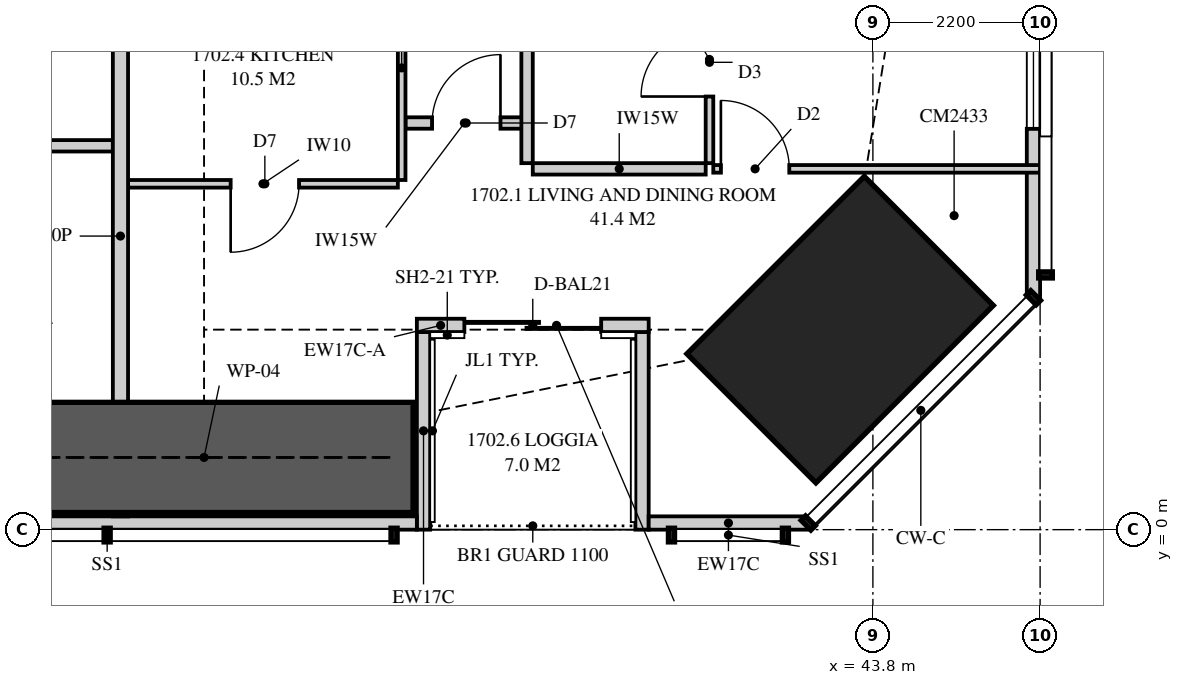
"""IFC4 building model, lengths in metres.
Left out: names, types, materials, properties, quantities, classifications, styles, units other than length and angle.
Written with IfcOpenShell. Run it as: python <this file> out.ifc"""

import sys

from ifc_helpers import new_model, si_unit, direction, frame, frame_2d, origin, origin_2d, place, context, subcontext, project, spatial, polyline, rectangle, outline, extrude, element, fill, save


model = new_model("IFC4")
c1 = context("Model", 3, precision=1e-05, world=origin(), true_north=direction((0.0, 1.0)))
c2 = subcontext(c1, "Body", "Model", "MODEL_VIEW")
j1 = project(units=[si_unit("LENGTHUNIT", "METRE"), si_unit("PLANEANGLEUNIT", "RADIAN")], contexts=[c1])
p1 = place(None, origin())
s1 = spatial("IfcSite", under=j1, at=p1, CompositionType="ELEMENT")
p2 = place(p1, origin())
s2 = spatial("IfcBuilding", under=s1, at=p2, CompositionType="ELEMENT")
p3 = place(p2, frame((0.0, 0.0, 64.55)))
s3 = spatial("IfcBuildingStorey", under=s2, at=p3, CompositionType="ELEMENT", Elevation=64.55)
p4 = place(p3, frame((43.369, 2.631, 0.0), z_axis=(0.0, 0.0, 1.0), x_axis=(-0.707106781187, 0.707106781187, 0.0)))
e1 = element("IfcColumn", 1, at=p4, inside=s3, PredefinedType="COLUMN", context=c2, shape_type="SweptSolid", body=[
    extrude(rectangle(XDim=2.4, YDim=3.3, at=origin_2d()), origin(), (0.0, 0.0, 1.0), 3.35),
])
p5 = place(p3, frame((20.525, 0.087, 0.0), z_axis=(0.0, 0.0, 1.0), x_axis=(1.0, 0.0, 0.0)))
e2 = element("IfcWall", 2, at=p5, inside=s3, PredefinedType="SOLIDWALL", context=c2, shape_type="SweptSolid", body=[
    extrude(outline(polyline([(0.0, 0.0), (17.275, 0.0), (17.275, 3.11), (14.679, 3.11), (14.679, 2.15), (14.631, 2.15), (14.631, 3.11), (14.475, 3.11), (14.475, 2.15), (0.0, 2.15), (0.0, 0.0)])), frame((0.0, 0.087, 0.0), z_axis=(0.0, -1.0, 0.0), x_axis=(1.0, 0.0, 0.0)), (0.0, 0.0, 1.0), 0.175),
])
p6 = place(p5, frame((6.775, 0.0, 0.4)))
e3 = element("IfcOpeningElement", 3, at=p6, cuts=e2, PredefinedType="OPENING", context=c2, shape_type="SweptSolid", body=[
    extrude(rectangle(XDim=1.8, YDim=1.7, at=frame_2d((0.9, 0.85))), frame((0.0, 0.097, 0.0), z_axis=(0.0, -1.0, 0.0), x_axis=(1.0, 0.0, 0.0)), (0.0, 0.0, 1.0), 0.195),
])
p7 = place(p5, frame((9.81, 0.0, 0.4)))
e4 = element("IfcOpeningElement", 4, at=p7, cuts=e2, PredefinedType="OPENING", context=c2, shape_type="SweptSolid", body=[
    extrude(rectangle(XDim=1.8, YDim=1.7, at=frame_2d((0.9, 0.85))), frame((0.0, 0.097, 0.0), z_axis=(0.0, -1.0, 0.0), x_axis=(1.0, 0.0, 0.0)), (0.0, 0.0, 1.0), 0.195),
])
p8 = place(p3, frame((40.85, 0.087, 0.0), z_axis=(0.0, 0.0, 1.0), x_axis=(1.0, 0.0, 0.0)))
e5 = element("IfcWall", 5, at=p8, inside=s3, PredefinedType="SOLIDWALL", context=c2, shape_type="SweptSolid", body=[
    extrude(rectangle(XDim=2.099, YDim=0.175, at=frame_2d((1.049, 0.0))), origin(), (0.0, 0.0, 1.0), 3.11),
])
p9 = place(p3, frame((37.8, 2.688, 0.0), z_axis=(0.0, 0.0, 1.0), x_axis=(1.0, 0.0, 0.0)))
e6 = element("IfcWall", 6, at=p9, inside=s3, PredefinedType="SOLIDWALL", context=c2, shape_type="SweptSolid", body=[
    extrude(rectangle(XDim=0.625, YDim=0.175, at=frame_2d((0.312, 0.0))), origin(), (0.0, 0.0, 1.0), 2.51),
])
p10 = place(p3, frame((38.425, 2.688, 0.0), z_axis=(0.0, 0.0, 1.0), x_axis=(1.0, 0.0, 0.0)))
e7 = element("IfcWall", 7, at=p10, inside=s3, PredefinedType="SOLIDWALL", context=c2, shape_type="SweptSolid", body=[
    extrude(rectangle(XDim=2.425, YDim=0.175, at=frame_2d((1.212, 0.0))), origin(), (0.0, 0.0, 1.0), 2.15),
])
p11 = place(p10, origin())
e8 = element("IfcOpeningElement", 8, at=p11, cuts=e7, PredefinedType="OPENING", context=c2, shape_type="SweptSolid", body=[
    extrude(rectangle(XDim=1.8, YDim=2.1, at=frame_2d((0.9, 1.05))), frame((0.0, 0.097, 0.0), z_axis=(0.0, -1.0, 0.0), x_axis=(1.0, 0.0, 0.0)), (0.0, 0.0, 1.0), 0.195),
])
p12 = place(p3, frame((37.887, 0.0, 0.0), z_axis=(0.0, 0.0, 1.0), x_axis=(0.0, 1.0, 0.0)))
e9 = element("IfcWall", 9, at=p12, inside=s3, PredefinedType="SOLIDWALL", context=c2, shape_type="SweptSolid", body=[
    extrude(outline(polyline([(0.0, 0.0), (2.6, 0.0), (2.6, 2.51), (2.364, 2.51), (2.364, 2.15), (0.697, 2.15), (0.697, 3.11), (0.0, 3.11), (0.0, 0.0)])), frame((0.0, 0.087, 0.0), z_axis=(0.0, -1.0, 0.0), x_axis=(1.0, 0.0, 0.0)), (0.0, 0.0, 1.0), 0.175),
])
p13 = place(p3, frame((40.762, 0.0, 0.0), z_axis=(0.0, 0.0, 1.0), x_axis=(0.0, 1.0, 0.0)))
e10 = element("IfcWall", 10, at=p13, inside=s3, PredefinedType="SOLIDWALL", context=c2, shape_type="SweptSolid", body=[
    extrude(outline(polyline([(0.0, 0.0), (2.6, 0.0), (2.6, 2.15), (1.274, 2.15), (1.274, 3.11), (0.0, 3.11), (0.0, 0.0)])), frame((0.0, 0.087, 0.0), z_axis=(0.0, -1.0, 0.0), x_axis=(1.0, 0.0, 0.0)), (0.0, 0.0, 1.0), 0.175),
])
p14 = place(p3, frame((45.913, 3.051, 0.0), z_axis=(0.0, 0.0, 1.0), x_axis=(0.0, 1.0, 0.0)))
e11 = element("IfcWall", 11, at=p14, inside=s3, PredefinedType="SOLIDWALL", context=c2, shape_type="SweptSolid", body=[
    extrude(outline(polyline([(0.0, 0.0), (31.897, 0.0), (31.897, 3.11), (22.167, 3.11), (22.167, 2.15), (22.074, 2.15), (22.074, 3.11), (21.949, 3.11), (21.949, 2.15), (9.949, 2.15), (9.949, 3.11), (9.823, 3.11), (9.823, 2.15), (9.73, 2.15), (9.73, 3.11), (0.0, 3.11), (0.0, 0.0)])), frame((0.0, 0.087, 0.0), z_axis=(0.0, -1.0, 0.0), x_axis=(1.0, 0.0, 0.0)), (0.0, 0.0, 1.0), 0.175),
])
p15 = place(p14, frame((2.222, 0.0, 0.4)))
e12 = element("IfcOpeningElement", 12, at=p15, cuts=e11, PredefinedType="OPENING", context=c2, shape_type="SweptSolid", body=[
    extrude(rectangle(XDim=1.8, YDim=1.7, at=frame_2d((0.9, 0.85))), frame((0.0, 0.097, 0.0), z_axis=(0.0, -1.0, 0.0), x_axis=(1.0, 0.0, 0.0)), (0.0, 0.0, 1.0), 0.195),
])
p16 = place(p14, frame((14.849, 0.0, 0.4)))
e13 = element("IfcOpeningElement", 13, at=p16, cuts=e11, PredefinedType="OPENING", context=c2, shape_type="SweptSolid", body=[
    extrude(rectangle(XDim=1.2, YDim=1.7, at=frame_2d((0.6, 0.85))), frame((0.0, 0.097, 0.0), z_axis=(0.0, -1.0, 0.0), x_axis=(1.0, 0.0, 0.0)), (0.0, 0.0, 1.0), 0.195),
])
p17 = place(p14, frame((27.375, 0.0, 0.4)))
e14 = element("IfcOpeningElement", 14, at=p17, cuts=e11, PredefinedType="OPENING", context=c2, shape_type="SweptSolid", body=[
    extrude(rectangle(XDim=1.8, YDim=1.7, at=frame_2d((0.9, 0.85))), frame((0.0, 0.097, 0.0), z_axis=(0.0, -1.0, 0.0), x_axis=(1.0, 0.0, 0.0)), (0.0, 0.0, 1.0), 0.195),
])
p18 = place(p3, frame((33.9, 0.175, 0.0), z_axis=(0.0, 0.0, 1.0), x_axis=(0.0, 1.0, 0.0)))
e15 = element("IfcWall", 15, at=p18, inside=s3, PredefinedType="PARTITIONING", context=c2, shape_type="SweptSolid", body=[
    extrude(outline(polyline([(0.529, 2.15), (0.0, 2.15), (0.0, 0.0), (0.529, 0.0), (0.529, 0.752), (1.021, 0.752), (1.021, 0.0), (7.375, 0.0), (7.375, 3.11), (1.685, 3.11), (1.685, 2.15), (1.021, 2.15), (1.021, 1.398), (0.529, 1.398), (0.529, 2.15)])), frame((0.0, 0.1, 0.0), z_axis=(0.0, -1.0, 0.0), x_axis=(1.0, 0.0, 0.0)), (0.0, 0.0, 1.0), 0.2),
])
p19 = place(p3, frame((29.95, 5.05, 0.0), z_axis=(0.0, 0.0, 1.0), x_axis=(1.0, 0.0, 0.0)))
e16 = element("IfcWall", 16, at=p19, inside=s3, PredefinedType="PLUMBINGWALL", context=c2, shape_type="SweptSolid", body=[
    extrude(rectangle(XDim=3.85, YDim=0.15, at=frame_2d((1.925, 0.0))), origin(), (0.0, 0.0, 1.0), 3.11),
])
p20 = place(p19, frame((0.4, 0.0, 0.0)))
e17 = element("IfcOpeningElement", 17, at=p20, cuts=e16, PredefinedType="OPENING", context=c2, shape_type="SweptSolid", body=[
    extrude(rectangle(XDim=0.9, YDim=2.1, at=frame_2d((0.45, 1.05))), frame((0.0, 0.085, 0.0), z_axis=(0.0, -1.0, 0.0), x_axis=(1.0, 0.0, 0.0)), (0.0, 0.0, 1.0), 0.17),
])
p21 = place(p3, frame((41.65, 4.822, 0.0), z_axis=(0.0, 0.0, 1.0), x_axis=(0.0, 1.0, 0.0)))
e18 = element("IfcWall", 18, at=p21, inside=s3, PredefinedType="PARTITIONING", context=c2, shape_type="SweptSolid", body=[
    extrude(rectangle(XDim=2.728, YDim=0.1, at=frame_2d((1.364, 0.0))), origin(), (0.0, 0.0, 1.0), 3.11),
])
p22 = place(p21, frame((0.877, 0.0, 0.0)))
e19 = element("IfcOpeningElement", 19, at=p22, cuts=e18, PredefinedType="OPENING", context=c2, shape_type="SweptSolid", body=[
    extrude(rectangle(XDim=0.9, YDim=2.1, at=frame_2d((0.45, 1.05))), frame((0.0, 0.06, 0.0), z_axis=(0.0, -1.0, 0.0), x_axis=(1.0, 0.0, 0.0)), (0.0, 0.0, 1.0), 0.12),
])
p23 = place(p3, frame((41.7, 4.747, 0.0), z_axis=(0.0, 0.0, 1.0), x_axis=(1.0, 0.0, 0.0)))
e20 = element("IfcWall", 20, at=p23, inside=s3, PredefinedType="PARTITIONING", context=c2, shape_type="SweptSolid", body=[
    extrude(outline(polyline([(0.0, 0.0), (4.3, 0.0), (4.3, 3.11), (2.883, 3.11), (2.883, 2.15), (1.14, 2.15), (1.14, 3.11), (0.0, 3.11), (0.0, 0.0)])), frame((0.0, 0.05, 0.0), z_axis=(0.0, -1.0, 0.0), x_axis=(1.0, 0.0, 0.0)), (0.0, 0.0, 1.0), 0.1),
])
p24 = place(p23, frame((0.1, 0.0, 0.0)))
e21 = element("IfcOpeningElement", 21, at=p24, cuts=e20, PredefinedType="OPENING", context=c2, shape_type="SweptSolid", body=[
    extrude(rectangle(XDim=0.9, YDim=2.1, at=frame_2d((0.45, 1.05))), frame((0.0, 0.06, 0.0), z_axis=(0.0, -1.0, 0.0), x_axis=(1.0, 0.0, 0.0)), (0.0, 0.0, 1.0), 0.12),
])
p25 = place(p3, frame((39.325, 4.747, 0.0), z_axis=(0.0, 0.0, 1.0), x_axis=(1.0, 0.0, 0.0)))
e22 = element("IfcWall", 22, at=p25, inside=s3, PredefinedType="PLUMBINGWALL", context=c2, shape_type="SweptSolid", body=[
    extrude(rectangle(XDim=2.275, YDim=0.15, at=frame_2d((1.138, 0.0))), origin(), (0.0, 0.0, 1.0), 3.11),
])
p26 = place(p3, frame((39.25, 4.822, 0.0), z_axis=(0.0, 0.0, 1.0), x_axis=(0.0, 1.0, 0.0)))
e23 = element("IfcWall", 23, at=p26, inside=s3, PredefinedType="PLUMBINGWALL", context=c2, shape_type="SweptSolid", body=[
    extrude(rectangle(XDim=2.728, YDim=0.15, at=frame_2d((1.364, 0.0))), origin(), (0.0, 0.0, 1.0), 3.11),
])
p27 = place(p3, frame((34.0, 4.55, 0.0), z_axis=(0.0, 0.0, 1.0), x_axis=(1.0, 0.0, 0.0)))
e24 = element("IfcWall", 24, at=p27, inside=s3, PredefinedType="PARTITIONING", context=c2, shape_type="SweptSolid", body=[
    extrude(outline(polyline([(0.0, 0.0), (3.55, 0.0), (3.55, 3.11), (1.287, 3.11), (1.287, 2.541), (0.713, 2.541), (0.713, 3.11), (0.0, 3.11), (0.0, 0.0)])), frame((0.0, 0.05, 0.0), z_axis=(0.0, -1.0, 0.0), x_axis=(1.0, 0.0, 0.0)), (0.0, 0.0, 1.0), 0.1),
])
p28 = place(p27, frame((1.35, 0.0, 0.0)))
e25 = element("IfcOpeningElement", 25, at=p28, cuts=e24, PredefinedType="OPENING", context=c2, shape_type="SweptSolid", body=[
    extrude(rectangle(XDim=0.9, YDim=2.1, at=frame_2d((0.45, 1.05))), frame((0.0, 0.06, 0.0), z_axis=(0.0, -1.0, 0.0), x_axis=(1.0, 0.0, 0.0)), (0.0, 0.0, 1.0), 0.12),
])
p29 = place(p3, frame((37.6, 4.6, 0.0), z_axis=(0.0, 0.0, 1.0), x_axis=(0.0, 1.0, 0.0)))
e26 = element("IfcWall", 26, at=p29, inside=s3, PredefinedType="PARTITIONING", context=c2, shape_type="SweptSolid", body=[
    extrude(rectangle(XDim=2.95, YDim=0.1, at=frame_2d((1.475, 0.0))), origin(), (0.0, 0.0, 1.0), 3.11),
])
p30 = place(p3, frame((37.65, 5.35, 0.0), z_axis=(0.0, 0.0, 1.0), x_axis=(1.0, 0.0, 0.0)))
e27 = element("IfcWall", 27, at=p30, inside=s3, PredefinedType="PLUMBINGWALL", context=c2, shape_type="SweptSolid", body=[
    extrude(rectangle(XDim=1.55, YDim=0.15, at=frame_2d((0.775, 0.0))), origin(), (0.0, 0.0, 1.0), 3.11),
])
p31 = place(p30, frame((0.35, 0.0, 0.0)))
e28 = element("IfcOpeningElement", 28, at=p31, cuts=e27, PredefinedType="OPENING", context=c2, shape_type="SweptSolid", body=[
    extrude(rectangle(XDim=0.9, YDim=2.1, at=frame_2d((0.45, 1.05))), frame((0.0, 0.085, 0.0), z_axis=(0.0, -1.0, 0.0), x_axis=(1.0, 0.0, 0.0)), (0.0, 0.0, 1.0), 0.17),
])
p32 = place(p3, frame((32.25, 0.95, 0.0), z_axis=(0.0, 0.0, 1.0), x_axis=(1.0, 0.0, 0.0)))
e29 = element("IfcWall", 29, at=p32, inside=s3, PredefinedType="SHEAR", context=c2, shape_type="SweptSolid", body=[
    extrude(rectangle(XDim=5.5, YDim=1.45, at=frame_2d((2.75, 0.0))), origin(), (0.0, 0.0, 1.0), 3.35),
])
p33 = place(p11, origin())
e30 = element("IfcDoor", 30, at=p33, inside=s3, OperationType="SLIDING_TO_LEFT", PredefinedType="DOOR", context=c2, shape_type="SweptSolid", body=[
    extrude(rectangle(XDim=1.8, YDim=2.1, at=frame_2d((0.9, 1.05))), frame((0.0, 0.025, 0.0), z_axis=(0.0, -1.0, 0.0), x_axis=(1.0, 0.0, 0.0)), (0.0, 0.0, 1.0), 0.05),
])
fill(e8, e30)
p34 = place(p15, origin())
e31 = element("IfcWindow", 31, at=p34, inside=s3, PartitioningType="SINGLE_PANEL", PredefinedType="WINDOW", context=c2, shape_type="SweptSolid", body=[
    extrude(rectangle(XDim=1.8, YDim=1.7, at=frame_2d((0.9, 0.85))), frame((0.0, 0.03, 0.0), z_axis=(0.0, -1.0, 0.0), x_axis=(1.0, 0.0, 0.0)), (0.0, 0.0, 1.0), 0.06),
])
fill(e12, e31)
p35 = place(p24, origin())
e32 = element("IfcDoor", 32, at=p35, inside=s3, OperationType="SINGLE_SWING_LEFT", PredefinedType="DOOR", context=c2, shape_type="SweptSolid", body=[
    extrude(rectangle(XDim=0.9, YDim=2.1, at=frame_2d((0.45, 1.05))), frame((0.0, 0.025, 0.0), z_axis=(0.0, -1.0, 0.0), x_axis=(1.0, 0.0, 0.0)), (0.0, 0.0, 1.0), 0.05),
])
fill(e21, e32)
p36 = place(p22, origin())
e33 = element("IfcDoor", 33, at=p36, inside=s3, OperationType="SINGLE_SWING_LEFT", PredefinedType="DOOR", context=c2, shape_type="SweptSolid", body=[
    extrude(rectangle(XDim=0.9, YDim=2.1, at=frame_2d((0.45, 1.05))), frame((0.0, 0.025, 0.0), z_axis=(0.0, -1.0, 0.0), x_axis=(1.0, 0.0, 0.0)), (0.0, 0.0, 1.0), 0.05),
])
fill(e19, e33)
p37 = place(p28, frame((0.9, 0.0, 0.0), z_axis=(0.0, 0.0, 1.0), x_axis=(-1.0, 0.0, 0.0)))
e34 = element("IfcDoor", 34, at=p37, inside=s3, OperationType="SINGLE_SWING_RIGHT", PredefinedType="DOOR", context=c2, shape_type="SweptSolid", body=[
    extrude(rectangle(XDim=0.9, YDim=2.1, at=frame_2d((0.45, 1.05))), frame((0.0, 0.025, 0.0), z_axis=(0.0, -1.0, 0.0), x_axis=(1.0, 0.0, 0.0)), (0.0, 0.0, 1.0), 0.05),
])
fill(e25, e34)
p38 = place(p31, origin())
e35 = element("IfcDoor", 35, at=p38, inside=s3, OperationType="SINGLE_SWING_RIGHT", PredefinedType="DOOR", context=c2, shape_type="SweptSolid", body=[
    extrude(rectangle(XDim=0.9, YDim=2.1, at=frame_2d((0.45, 1.05))), frame((0.0, 0.025, 0.0), z_axis=(0.0, -1.0, 0.0), x_axis=(1.0, 0.0, 0.0)), (0.0, 0.0, 1.0), 0.05),
])
fill(e28, e35)
save(model, sys.argv[1])
